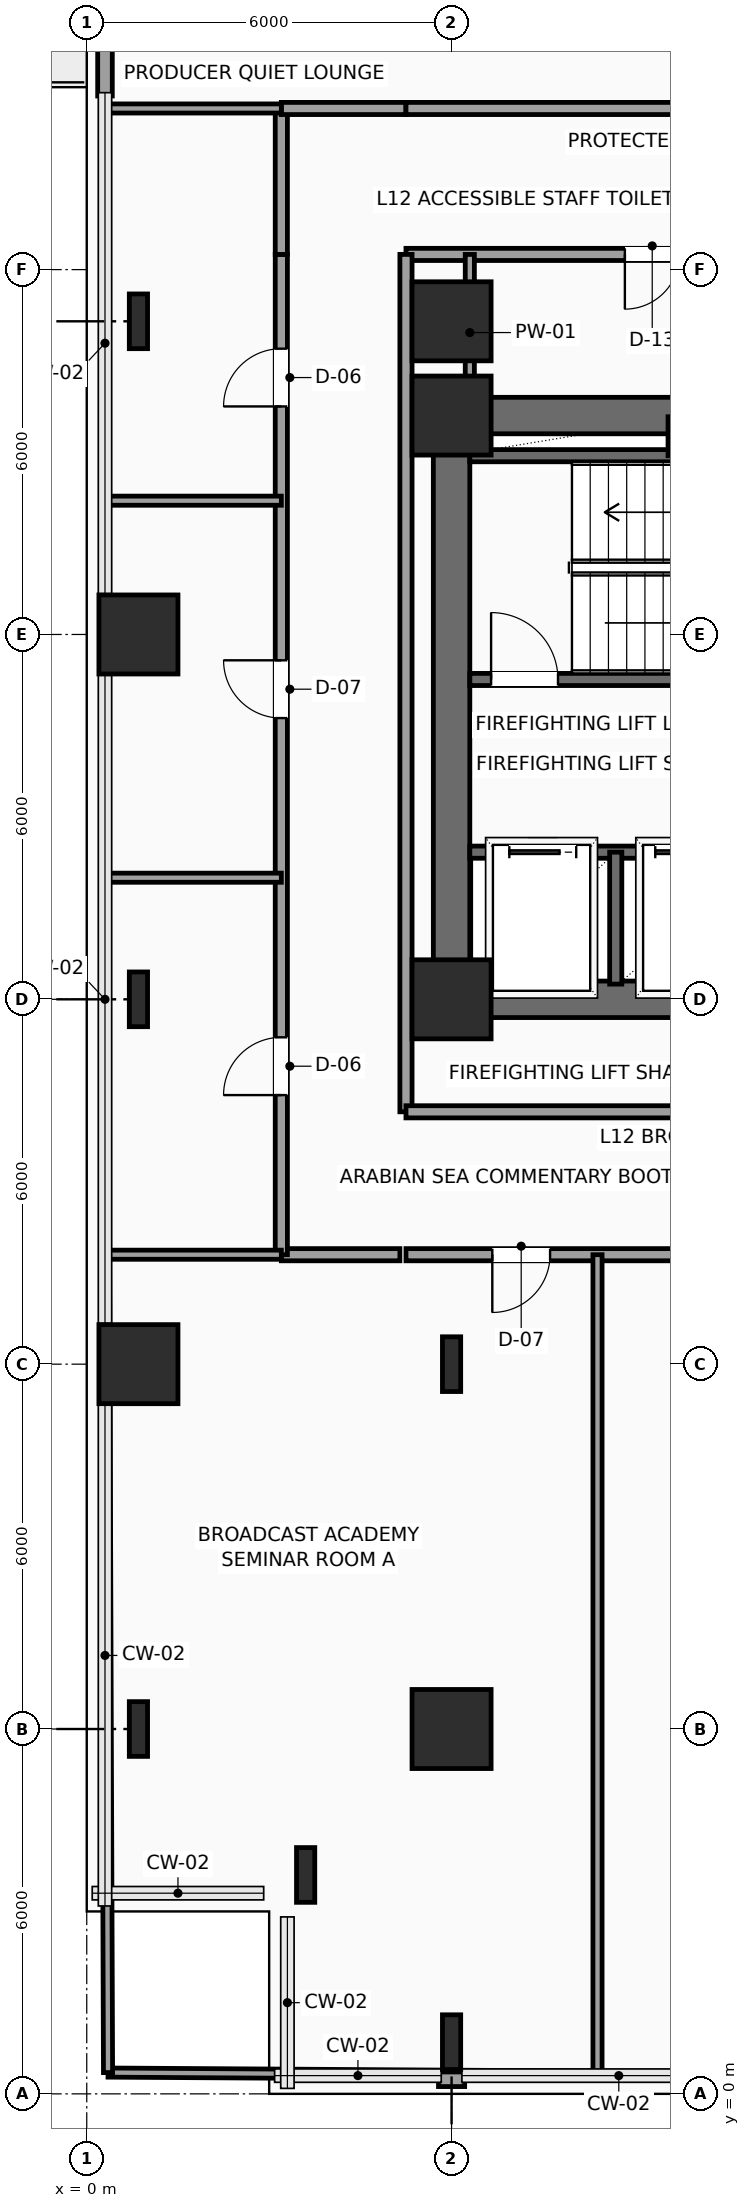
"""IFC4 building model, lengths in metres.
Left out: names, types, materials, properties, quantities, classifications, styles, units other than length and angle.
Written with IfcOpenShell. Run it as: python <this file> out.ifc"""

import sys

from ifc_helpers import new_model, si_unit, direction, frame, frame_2d, origin, origin_2d, place, context, subcontext, project, spatial, rectangle, i_section, extrude, element, fill, save


model = new_model("IFC4")
c1 = context("Model", 3, precision=1e-05, world=origin(), true_north=direction((0.0, 1.0)))
c2 = subcontext(c1, "Body", "Model", "MODEL_VIEW")
j1 = project(units=[si_unit("LENGTHUNIT", "METRE"), si_unit("PLANEANGLEUNIT", "RADIAN")], contexts=[c1])
p1 = place(None, origin())
s1 = spatial("IfcSite", under=j1, at=p1, CompositionType="ELEMENT")
p2 = place(p1, origin())
s2 = spatial("IfcBuilding", under=s1, at=p2, CompositionType="ELEMENT")
p3 = place(p2, frame((0.0, 0.0, 55.8)))
s3 = spatial("IfcBuildingStorey", under=s2, at=p3, CompositionType="ELEMENT", Elevation=55.8)
for number, where, z_axis, x_axis in (
    (1, (6.0, 18.0, 0.0), (0.0, 0.0, 1.0), (1.0, 0.0, 0.0)),
    (2, (6.0, 27.6, 0.0), (0.0, 0.0, 1.0), (1.0, 0.0, 0.0)),
):
    element("IfcColumn", number, at=place(p3, frame(where, z_axis=z_axis, x_axis=x_axis)), inside=s3, PredefinedType="COLUMN", context=c2, shape_type="SweptSolid", body=[
        extrude(rectangle(XDim=1.3, YDim=1.3, at=origin_2d()), origin(), (0.0, 0.0, 1.0), 3.9),
    ])
for number, where, z_axis, x_axis in (
    (3, (3.6, 3.6, 0.0), (0.0, 0.0, 1.0), (1.0, 0.0, 0.0)),
    (4, (0.85, 6.0, 0.0), (0.0, 0.0, 1.0), (1.0, 0.0, 0.0)),
):
    element("IfcColumn", number, at=place(p3, frame(where, z_axis=z_axis, x_axis=x_axis)), inside=s3, PredefinedType="COLUMN", context=c2, shape_type="SweptSolid", body=[
        extrude(i_section(OverallWidth=0.3, OverallDepth=0.9, WebThickness=0.019, FlangeThickness=0.035, FilletRadius=0.03, at=origin_2d()), origin(), (0.0, 0.0, 1.0), 3.9),
    ])
p4 = place(p3, frame((0.85, 12.0, 0.0), z_axis=(0.0, 0.0, 1.0), x_axis=(1.0, 0.0, 0.0)))
e5 = element("IfcColumn", 5, at=p4, inside=s3, PredefinedType="COLUMN", context=c2, shape_type="SweptSolid", body=[
    extrude(rectangle(XDim=1.3, YDim=1.3, at=origin_2d()), origin(), (0.0, 0.0, 1.0), 3.9),
])
p5 = place(p3, frame((0.85, 18.0, 0.0), z_axis=(0.0, 0.0, 1.0), x_axis=(1.0, 0.0, 0.0)))
e6 = element("IfcColumn", 6, at=p5, inside=s3, PredefinedType="COLUMN", context=c2, shape_type="SweptSolid", body=[
    extrude(i_section(OverallWidth=0.3, OverallDepth=0.9, WebThickness=0.019, FlangeThickness=0.035, FilletRadius=0.03, at=origin_2d()), origin(), (0.0, 0.0, 1.0), 3.9),
])
p6 = place(p3, frame((0.85, 24.0, 0.0), z_axis=(0.0, 0.0, 1.0), x_axis=(1.0, 0.0, 0.0)))
e7 = element("IfcColumn", 7, at=p6, inside=s3, PredefinedType="COLUMN", context=c2, shape_type="SweptSolid", body=[
    extrude(rectangle(XDim=1.3, YDim=1.3, at=origin_2d()), origin(), (0.0, 0.0, 1.0), 3.9),
])
for number, where, z_axis, x_axis in (
    (8, (0.85, 29.15, 0.0), (0.0, 0.0, 1.0), (1.0, 0.0, 0.0)),
    (9, (6.0, 0.85, 0.0), (0.0, 0.0, 1.0), (1.0, 0.0, 0.0)),
):
    element("IfcColumn", number, at=place(p3, frame(where, z_axis=z_axis, x_axis=x_axis)), inside=s3, PredefinedType="COLUMN", context=c2, shape_type="SweptSolid", body=[
        extrude(i_section(OverallWidth=0.3, OverallDepth=0.9, WebThickness=0.019, FlangeThickness=0.035, FilletRadius=0.03, at=origin_2d()), origin(), (0.0, 0.0, 1.0), 3.9),
    ])
p7 = place(p3, frame((6.0, 6.0, 0.0), z_axis=(0.0, 0.0, 1.0), x_axis=(1.0, 0.0, 0.0)))
e10 = element("IfcColumn", 10, at=p7, inside=s3, PredefinedType="COLUMN", context=c2, shape_type="SweptSolid", body=[
    extrude(rectangle(XDim=1.3, YDim=1.3, at=origin_2d()), origin(), (0.0, 0.0, 1.0), 3.9),
])
p8 = place(p3, frame((6.0, 12.0, 0.0), z_axis=(0.0, 0.0, 1.0), x_axis=(1.0, 0.0, 0.0)))
e11 = element("IfcColumn", 11, at=p8, inside=s3, PredefinedType="COLUMN", context=c2, shape_type="SweptSolid", body=[
    extrude(i_section(OverallWidth=0.3, OverallDepth=0.9, WebThickness=0.019, FlangeThickness=0.035, FilletRadius=0.03, at=origin_2d()), origin(), (0.0, 0.0, 1.0), 3.9),
])
p9 = place(p3, frame((6.0, 29.15, 0.0), z_axis=(0.0, 0.0, 1.0), x_axis=(1.0, 0.0, 0.0)))
e12 = element("IfcColumn", 12, at=p9, inside=s3, PredefinedType="COLUMN", context=c2, shape_type="SweptSolid", body=[
    extrude(rectangle(XDim=1.3, YDim=1.3, at=origin_2d()), origin(), (0.0, 0.0, 1.0), 3.9),
])
p10 = place(p3, frame((0.3, 32.855, 0.0), z_axis=(0.0, 0.0, 1.0), x_axis=(0.0, 1.0, 0.0)))
e13 = element("IfcWall", 13, at=p10, inside=s3, PredefinedType="SOLIDWALL", context=c2, shape_type="SweptSolid", body=[
    extrude(rectangle(XDim=9.29, YDim=0.24, at=frame_2d((4.645, 0.0))), origin(), (0.0, 0.0, 1.0), 3.65),
])
p11 = place(p10, frame((3.2, 0.0, 0.0)))
e14 = element("IfcOpeningElement", 14, at=p11, cuts=e13, PredefinedType="OPENING", context=c2, shape_type="SweptSolid", body=[
    extrude(rectangle(XDim=1.05, YDim=2.2, at=frame_2d((0.525, 1.1))), frame((0.0, 0.13, 0.0), z_axis=(0.0, -1.0, 0.0), x_axis=(1.0, 0.0, 0.0)), (0.0, 0.0, 1.0), 0.26),
])
p12 = place(p3, frame((6.215, 0.24, 0.0), z_axis=(0.0, 0.0, 1.0), x_axis=(-1.0, 0.0, 0.0)))
e15 = element("IfcWall", 15, at=p12, inside=s3, PredefinedType="SOLIDWALL", context=c2, shape_type="SweptSolid", body=[
    extrude(rectangle(XDim=0.43, YDim=0.24, at=frame_2d((0.215, 0.0))), origin(), (0.0, 0.0, 1.0), 3.65),
])
p13 = place(p3, frame((6.0, 18.0, 0.0), z_axis=(0.0, 0.0, 1.0), x_axis=(1.0, 0.0, 0.0)))
e16 = element("IfcWall", 16, at=p13, inside=s3, PredefinedType="SHEAR", context=c2, shape_type="SweptSolid", body=[
    extrude(rectangle(XDim=12.0, YDim=0.6, at=frame_2d((6.0, 0.0))), origin(), (0.0, 0.0, 1.0), 3.65),
])
p14 = place(p13, frame((7.15, 0.0, 0.0)))
e17 = element("IfcOpeningElement", 17, at=p14, cuts=e16, PredefinedType="OPENING", context=c2, shape_type="SweptSolid", body=[
    extrude(rectangle(XDim=1.6, YDim=2.3, at=frame_2d((0.8, 1.15))), frame((0.0, 0.31, 0.0), z_axis=(0.0, -1.0, 0.0), x_axis=(1.0, 0.0, 0.0)), (0.0, 0.0, 1.0), 0.62),
])
p15 = place(p3, frame((6.0, 27.6, 0.0), z_axis=(0.0, 0.0, 1.0), x_axis=(1.0, 0.0, 0.0)))
e18 = element("IfcWall", 18, at=p15, inside=s3, PredefinedType="SHEAR", context=c2, shape_type="SweptSolid", body=[
    extrude(rectangle(XDim=12.0, YDim=0.6, at=frame_2d((6.0, 0.0))), origin(), (0.0, 0.0, 1.0), 3.65),
])
p16 = place(p15, frame((10.2, 0.0, 0.0)))
e19 = element("IfcOpeningElement", 19, at=p16, cuts=e18, PredefinedType="OPENING", context=c2, shape_type="SweptSolid", body=[
    extrude(rectangle(XDim=0.9, YDim=2.15, at=frame_2d((0.45, 1.075))), frame((0.0, 0.31, 0.0), z_axis=(0.0, -1.0, 0.0), x_axis=(1.0, 0.0, 0.0)), (0.0, 0.0, 1.0), 0.62),
])
p17 = place(p3, frame((6.0, 18.0, 0.0), z_axis=(0.0, 0.0, 1.0), x_axis=(0.0, 1.0, 0.0)))
e20 = element("IfcWall", 20, at=p17, inside=s3, PredefinedType="SHEAR", context=c2, shape_type="SweptSolid", body=[
    extrude(rectangle(XDim=9.6, YDim=0.6, at=frame_2d((4.8, 0.0))), origin(), (0.0, 0.0, 1.0), 3.65),
])
p18 = place(p3, frame((6.3, 23.26, 0.0), z_axis=(0.0, 0.0, 1.0), x_axis=(1.0, 0.0, 0.0)))
e21 = element("IfcWall", 21, at=p18, inside=s3, PredefinedType="SHEAR", context=c2, shape_type="SweptSolid", body=[
    extrude(rectangle(XDim=8.88, YDim=0.2, at=frame_2d((4.44, 0.0))), origin(), (0.0, 0.0, 1.0), 3.65),
])
p19 = place(p18, frame((0.35, 0.0, 0.0)))
e22 = element("IfcOpeningElement", 22, at=p19, cuts=e21, PredefinedType="OPENING", context=c2, shape_type="SweptSolid", body=[
    extrude(rectangle(XDim=1.1, YDim=2.2, at=frame_2d((0.55, 1.1))), frame((0.0, 0.11, 0.0), z_axis=(0.0, -1.0, 0.0), x_axis=(1.0, 0.0, 0.0)), (0.0, 0.0, 1.0), 0.22),
])
p20 = place(p3, frame((6.3, 26.94, 0.0), z_axis=(0.0, 0.0, 1.0), x_axis=(1.0, 0.0, 0.0)))
e23 = element("IfcWall", 23, at=p20, inside=s3, PredefinedType="SHEAR", context=c2, shape_type="SweptSolid", body=[
    extrude(rectangle(XDim=8.88, YDim=0.2, at=frame_2d((4.44, 0.0))), origin(), (0.0, 0.0, 1.0), 3.65),
])
p21 = place(p3, frame((6.3, 20.42, 0.0), z_axis=(0.0, 0.0, 1.0), x_axis=(1.0, 0.0, 0.0)))
e24 = element("IfcWall", 24, at=p21, inside=s3, PredefinedType="SHEAR", context=c2, shape_type="SweptSolid", body=[
    extrude(rectangle(XDim=4.95, YDim=0.2, at=frame_2d((2.475, 0.0))), origin(), (0.0, 0.0, 1.0), 3.65),
])
p22 = place(p21, frame((0.65, 0.0, 0.0)))
e25 = element("IfcOpeningElement", 25, at=p22, cuts=e24, PredefinedType="OPENING", context=c2, shape_type="SweptSolid", body=[
    extrude(rectangle(XDim=1.1, YDim=2.2, at=frame_2d((0.55, 1.1))), frame((0.0, 0.11, 0.0), z_axis=(0.0, -1.0, 0.0), x_axis=(1.0, 0.0, 0.0)), (0.0, 0.0, 1.0), 0.22),
])
p23 = place(p21, frame((3.05, 0.0, 0.0)))
e26 = element("IfcOpeningElement", 26, at=p23, cuts=e24, PredefinedType="OPENING", context=c2, shape_type="SweptSolid", body=[
    extrude(rectangle(XDim=1.1, YDim=2.2, at=frame_2d((0.55, 1.1))), frame((0.0, 0.11, 0.0), z_axis=(0.0, -1.0, 0.0), x_axis=(1.0, 0.0, 0.0)), (0.0, 0.0, 1.0), 0.22),
])
p24 = place(p3, frame((8.7, 18.25, 0.0), z_axis=(0.0, 0.0, 1.0), x_axis=(0.0, 1.0, 0.0)))
e27 = element("IfcWall", 27, at=p24, inside=s3, PredefinedType="SHEAR", context=c2, shape_type="SweptSolid", body=[
    extrude(rectangle(XDim=2.17, YDim=0.2, at=frame_2d((1.085, 0.0))), origin(), (0.0, 0.0, 1.0), 3.65),
])
p25 = place(p3, frame((9.66, 26.94, 0.0), z_axis=(0.0, 0.0, 1.0), x_axis=(0.0, 1.0, 0.0)))
e28 = element("IfcWall", 28, at=p25, inside=s3, PredefinedType="SOLIDWALL", context=c2, shape_type="SweptSolid", body=[
    extrude(rectangle(XDim=0.64, YDim=0.2, at=frame_2d((0.32, 0.0))), origin(), (0.0, 0.0, 1.0), 3.65),
])
p26 = place(p3, frame((12.4, 13.8, 0.0), z_axis=(0.0, 0.0, 1.0), x_axis=(-1.0, 0.0, 0.0)))
e29 = element("IfcWall", 29, at=p26, inside=s3, PredefinedType="SOLIDWALL", context=c2, shape_type="SweptSolid", body=[
    extrude(rectangle(XDim=7.15, YDim=0.2, at=frame_2d((3.575, 0.0))), origin(), (0.0, 0.0, 1.0), 3.65),
])
p27 = place(p26, frame((4.78, 0.0, 0.0)))
e30 = element("IfcOpeningElement", 30, at=p27, cuts=e29, PredefinedType="OPENING", context=c2, shape_type="SweptSolid", body=[
    extrude(rectangle(XDim=0.95, YDim=2.15, at=frame_2d((0.475, 1.075))), frame((0.0, 0.11, 0.0), z_axis=(0.0, -1.0, 0.0), x_axis=(1.0, 0.0, 0.0)), (0.0, 0.0, 1.0), 0.22),
])
p28 = place(p3, frame((5.15, 13.8, 0.0), z_axis=(0.0, 0.0, 1.0), x_axis=(-1.0, 0.0, 0.0)))
e31 = element("IfcWall", 31, at=p28, inside=s3, PredefinedType="SOLIDWALL", context=c2, shape_type="SweptSolid", body=[
    extrude(rectangle(XDim=1.95, YDim=0.2, at=frame_2d((0.975, 0.0))), origin(), (0.0, 0.0, 1.0), 3.65),
])
p29 = place(p3, frame((3.2, 13.8, 0.0), z_axis=(0.0, 0.0, 1.0), x_axis=(0.0, 1.0, 0.0)))
e32 = element("IfcWall", 32, at=p29, inside=s3, PredefinedType="SOLIDWALL", context=c2, shape_type="SweptSolid", body=[
    extrude(rectangle(XDim=16.45, YDim=0.2, at=frame_2d((8.225, 0.0))), origin(), (0.0, 0.0, 1.0), 3.65),
])
p30 = place(p29, frame((2.625, 0.0, 0.0)))
e33 = element("IfcOpeningElement", 33, at=p30, cuts=e32, PredefinedType="OPENING", context=c2, shape_type="SweptSolid", body=[
    extrude(rectangle(XDim=0.95, YDim=2.15, at=frame_2d((0.475, 1.075))), frame((0.0, 0.11, 0.0), z_axis=(0.0, -1.0, 0.0), x_axis=(1.0, 0.0, 0.0)), (0.0, 0.0, 1.0), 0.22),
])
p31 = place(p29, frame((8.825, 0.0, 0.0)))
e34 = element("IfcOpeningElement", 34, at=p31, cuts=e32, PredefinedType="OPENING", context=c2, shape_type="SweptSolid", body=[
    extrude(rectangle(XDim=0.95, YDim=2.15, at=frame_2d((0.475, 1.075))), frame((0.0, 0.11, 0.0), z_axis=(0.0, -1.0, 0.0), x_axis=(1.0, 0.0, 0.0)), (0.0, 0.0, 1.0), 0.22),
])
p32 = place(p29, frame((13.95, 0.0, 0.0)))
e35 = element("IfcOpeningElement", 35, at=p32, cuts=e32, PredefinedType="OPENING", context=c2, shape_type="SweptSolid", body=[
    extrude(rectangle(XDim=0.95, YDim=2.15, at=frame_2d((0.475, 1.075))), frame((0.0, 0.11, 0.0), z_axis=(0.0, -1.0, 0.0), x_axis=(1.0, 0.0, 0.0)), (0.0, 0.0, 1.0), 0.22),
])
p33 = place(p3, frame((3.2, 30.25, 0.0), z_axis=(0.0, 0.0, 1.0), x_axis=(0.0, 1.0, 0.0)))
e36 = element("IfcWall", 36, at=p33, inside=s3, PredefinedType="SOLIDWALL", context=c2, shape_type="SweptSolid", body=[
    extrude(rectangle(XDim=2.4, YDim=0.2, at=frame_2d((1.2, 0.0))), origin(), (0.0, 0.0, 1.0), 3.65),
])
p34 = place(p3, frame((3.2, 32.65, 0.0), z_axis=(0.0, 0.0, 1.0), x_axis=(1.0, 0.0, 0.0)))
e37 = element("IfcWall", 37, at=p34, inside=s3, PredefinedType="SOLIDWALL", context=c2, shape_type="SweptSolid", body=[
    extrude(rectangle(XDim=2.05, YDim=0.2, at=frame_2d((1.025, 0.0))), origin(), (0.0, 0.0, 1.0), 3.65),
])
p35 = place(p3, frame((5.25, 32.65, 0.0), z_axis=(0.0, 0.0, 1.0), x_axis=(1.0, 0.0, 0.0)))
e38 = element("IfcWall", 38, at=p35, inside=s3, PredefinedType="SOLIDWALL", context=c2, shape_type="SweptSolid", body=[
    extrude(rectangle(XDim=8.55, YDim=0.2, at=frame_2d((4.275, 0.0))), origin(), (0.0, 0.0, 1.0), 3.65),
])
p36 = place(p3, frame((15.88, 30.25, 0.0), z_axis=(0.0, 0.0, 1.0), x_axis=(-1.0, 0.0, 0.0)))
e39 = element("IfcWall", 39, at=p36, inside=s3, PredefinedType="SOLIDWALL", context=c2, shape_type="SweptSolid", body=[
    extrude(rectangle(XDim=10.63, YDim=0.2, at=frame_2d((5.315, 0.0))), origin(), (0.0, 0.0, 1.0), 3.65),
])
p37 = place(p36, frame((6.13, 0.0, 0.0)))
e40 = element("IfcOpeningElement", 40, at=p37, cuts=e39, PredefinedType="OPENING", context=c2, shape_type="SweptSolid", body=[
    extrude(rectangle(XDim=0.9, YDim=2.1, at=frame_2d((0.45, 1.05))), frame((0.0, 0.11, 0.0), z_axis=(0.0, -1.0, 0.0), x_axis=(1.0, 0.0, 0.0)), (0.0, 0.0, 1.0), 0.22),
])
p38 = place(p3, frame((5.25, 30.25, 0.0), z_axis=(0.0, 0.0, 1.0), x_axis=(0.0, -1.0, 0.0)))
e41 = element("IfcWall", 41, at=p38, inside=s3, PredefinedType="SOLIDWALL", context=c2, shape_type="SweptSolid", body=[
    extrude(rectangle(XDim=14.1, YDim=0.2, at=frame_2d((7.05, 0.0))), origin(), (0.0, 0.0, 1.0), 3.65),
])
p39 = place(p3, frame((5.25, 16.15, 0.0), z_axis=(0.0, 0.0, 1.0), x_axis=(1.0, 0.0, 0.0)))
e42 = element("IfcWall", 42, at=p39, inside=s3, PredefinedType="SOLIDWALL", context=c2, shape_type="SweptSolid", body=[
    extrude(rectangle(XDim=7.15, YDim=0.2, at=frame_2d((3.575, 0.0))), origin(), (0.0, 0.0, 1.0), 3.65),
])
p40 = place(p3, frame((6.3, 27.68, 0.0), z_axis=(0.0, 0.0, 1.0), x_axis=(0.0, 1.0, 0.0)))
e43 = element("IfcWall", 43, at=p40, inside=s3, PredefinedType="PARTITIONING", context=c2, shape_type="SweptSolid", body=[
    extrude(rectangle(XDim=2.57, YDim=0.15, at=frame_2d((1.285, 0.0))), origin(), (0.0, 0.0, 1.0), 2.992),
])
p41 = place(p3, frame((0.35, 0.35, 0.0), z_axis=(0.0, 0.0, 1.0), x_axis=(0.999980506152, -0.006243982317, 0.0)))
e44 = element("IfcWall", 44, at=p41, inside=s3, PredefinedType="PARTITIONING", context=c2, shape_type="SweptSolid", body=[
    extrude(rectangle(XDim=5.435, YDim=0.15, at=frame_2d((2.717, 0.0))), origin(), (0.0, 0.0, 1.0), 3.65),
])
p42 = place(p3, frame((6.215, 0.314, 0.0), z_axis=(0.0, 0.0, 1.0), x_axis=(0.99998042128, -0.006257559905, 0.0)))
e45 = element("IfcWall", 45, at=p42, inside=s3, PredefinedType="PARTITIONING", context=c2, shape_type="SweptSolid", body=[
    extrude(rectangle(XDim=2.185, YDim=0.15, at=frame_2d((1.092, 0.0))), origin(), (0.0, 0.0, 1.0), 3.65),
])
p43 = place(p3, frame((0.35, 0.35, 0.0), z_axis=(0.0, 0.0, 1.0), x_axis=(-0.003721090209, 0.99999307672, 0.0)))
e46 = element("IfcWall", 46, at=p43, inside=s3, PredefinedType="PARTITIONING", context=c2, shape_type="SweptSolid", body=[
    extrude(rectangle(XDim=13.45, YDim=0.15, at=frame_2d((6.725, 0.0))), origin(), (0.0, 0.0, 1.0), 3.65),
])
p44 = place(p3, frame((8.4, 0.3, 0.0), z_axis=(0.0, 0.0, 1.0), x_axis=(0.0, 1.0, 0.0)))
e47 = element("IfcWall", 47, at=p44, inside=s3, PredefinedType="PARTITIONING", context=c2, shape_type="SweptSolid", body=[
    extrude(rectangle(XDim=13.5, YDim=0.15, at=frame_2d((6.75, 0.0))), origin(), (0.0, 0.0, 1.0), 3.65),
])
for number, where, z_axis, x_axis in (
    (48, (0.3, 13.8, 0.0), (0.0, 0.0, 1.0), (1.0, 0.0, 0.0)),
    (49, (0.3, 20.0, 0.0), (0.0, 0.0, 1.0), (1.0, 0.0, 0.0)),
    (50, (0.3, 26.2, 0.0), (0.0, 0.0, 1.0), (1.0, 0.0, 0.0)),
    (51, (0.3, 32.65, 0.0), (0.0, 0.0, 1.0), (1.0, 0.0, 0.0)),
):
    element("IfcWall", number, at=place(p3, frame(where, z_axis=z_axis, x_axis=x_axis)), inside=s3, PredefinedType="PARTITIONING", context=c2, shape_type="SweptSolid", body=[
        extrude(rectangle(XDim=2.9, YDim=0.15, at=frame_2d((1.45, 0.0))), origin(), (0.0, 0.0, 1.0), 3.65),
    ])
p45 = place(p19, origin())
e52 = element("IfcDoor", 52, at=p45, inside=s3, OperationType="SINGLE_SWING_LEFT", PredefinedType="DOOR", context=c2, shape_type="SweptSolid", body=[
    extrude(rectangle(XDim=1.1, YDim=2.2, at=frame_2d((0.55, 1.1))), frame((0.0, 0.025, 0.0), z_axis=(0.0, -1.0, 0.0), x_axis=(1.0, 0.0, 0.0)), (0.0, 0.0, 1.0), 0.05),
])
fill(e22, e52)
p46 = place(p22, origin())
e53 = element("IfcDoor", 53, at=p46, inside=s3, OperationType="SLIDING_TO_LEFT", PredefinedType="DOOR", context=c2, shape_type="SweptSolid", body=[
    extrude(rectangle(XDim=1.1, YDim=2.2, at=frame_2d((0.55, 1.1))), frame((0.0, 0.025, 0.0), z_axis=(0.0, -1.0, 0.0), x_axis=(1.0, 0.0, 0.0)), (0.0, 0.0, 1.0), 0.05),
])
fill(e25, e53)
p47 = place(p23, origin())
e54 = element("IfcDoor", 54, at=p47, inside=s3, OperationType="SLIDING_TO_LEFT", PredefinedType="DOOR", context=c2, shape_type="SweptSolid", body=[
    extrude(rectangle(XDim=1.1, YDim=2.2, at=frame_2d((0.55, 1.1))), frame((0.0, 0.025, 0.0), z_axis=(0.0, -1.0, 0.0), x_axis=(1.0, 0.0, 0.0)), (0.0, 0.0, 1.0), 0.05),
])
fill(e26, e54)
p48 = place(p27, origin())
e55 = element("IfcDoor", 55, at=p48, inside=s3, OperationType="SINGLE_SWING_RIGHT", PredefinedType="DOOR", context=c2, shape_type="SweptSolid", body=[
    extrude(rectangle(XDim=0.95, YDim=2.15, at=frame_2d((0.475, 1.075))), frame((0.0, 0.025, 0.0), z_axis=(0.0, -1.0, 0.0), x_axis=(1.0, 0.0, 0.0)), (0.0, 0.0, 1.0), 0.05),
])
fill(e30, e55)
p49 = place(p30, origin())
e56 = element("IfcDoor", 56, at=p49, inside=s3, OperationType="SINGLE_SWING_LEFT", PredefinedType="DOOR", context=c2, shape_type="SweptSolid", body=[
    extrude(rectangle(XDim=0.95, YDim=2.15, at=frame_2d((0.475, 1.075))), frame((0.0, 0.025, 0.0), z_axis=(0.0, -1.0, 0.0), x_axis=(1.0, 0.0, 0.0)), (0.0, 0.0, 1.0), 0.05),
])
fill(e33, e56)
p50 = place(p31, origin())
e57 = element("IfcDoor", 57, at=p50, inside=s3, OperationType="SINGLE_SWING_RIGHT", PredefinedType="DOOR", context=c2, shape_type="SweptSolid", body=[
    extrude(rectangle(XDim=0.95, YDim=2.15, at=frame_2d((0.475, 1.075))), frame((0.0, 0.025, 0.0), z_axis=(0.0, -1.0, 0.0), x_axis=(1.0, 0.0, 0.0)), (0.0, 0.0, 1.0), 0.05),
])
fill(e34, e57)
p51 = place(p32, origin())
e58 = element("IfcDoor", 58, at=p51, inside=s3, OperationType="SINGLE_SWING_LEFT", PredefinedType="DOOR", context=c2, shape_type="SweptSolid", body=[
    extrude(rectangle(XDim=0.95, YDim=2.15, at=frame_2d((0.475, 1.075))), frame((0.0, 0.025, 0.0), z_axis=(0.0, -1.0, 0.0), x_axis=(1.0, 0.0, 0.0)), (0.0, 0.0, 1.0), 0.05),
])
fill(e35, e58)
p52 = place(p37, origin())
e59 = element("IfcDoor", 59, at=p52, inside=s3, OperationType="SINGLE_SWING_RIGHT", PredefinedType="DOOR", context=c2, shape_type="SweptSolid", body=[
    extrude(rectangle(XDim=0.9, YDim=2.1, at=frame_2d((0.45, 1.05))), frame((0.0, 0.025, 0.0), z_axis=(0.0, -1.0, 0.0), x_axis=(1.0, 0.0, 0.0)), (0.0, 0.0, 1.0), 0.05),
])
fill(e40, e59)
save(model, sys.argv[1])
